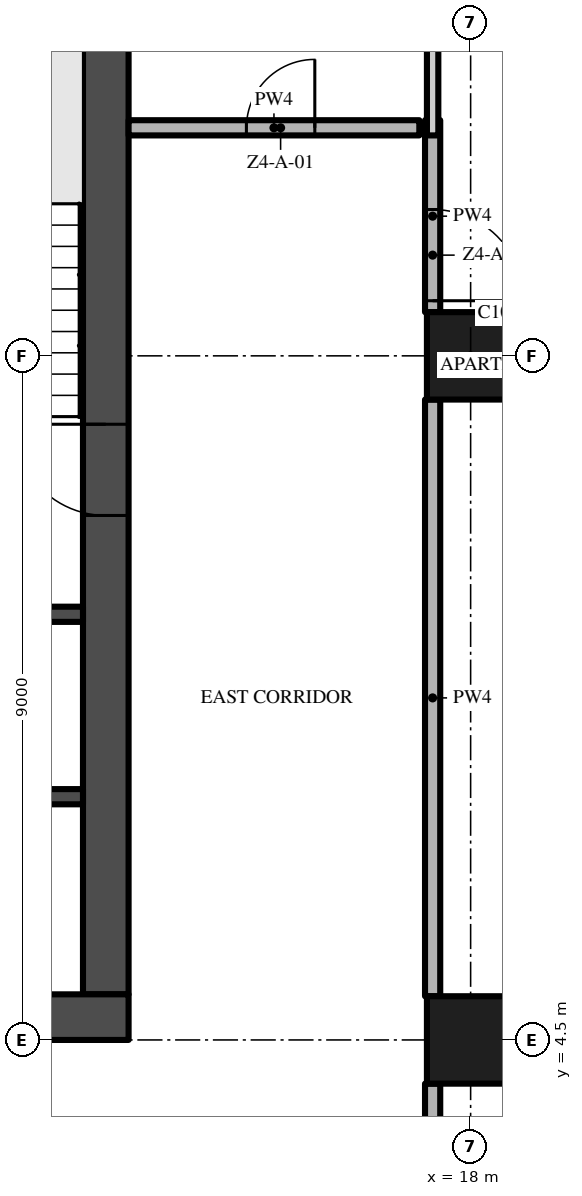
"""IFC4 building model, lengths in metres.
Left out: names, types, materials, properties, quantities, classifications, styles, units other than length and angle.
Written with IfcOpenShell. Run it as: python <this file> out.ifc"""

import sys

from ifc_helpers import new_model, si_unit, direction, frame, frame_2d, origin, origin_2d, place, context, subcontext, project, spatial, rectangle, extrude, element, fill, save


model = new_model("IFC4")
c1 = context("Model", 3, precision=1e-05, world=origin(), true_north=direction((0.0, 1.0)))
c2 = subcontext(c1, "Body", "Model", "MODEL_VIEW")
j1 = project(units=[si_unit("LENGTHUNIT", "METRE"), si_unit("PLANEANGLEUNIT", "RADIAN")], contexts=[c1])
p1 = place(None, origin())
s1 = spatial("IfcSite", under=j1, at=p1, CompositionType="ELEMENT")
p2 = place(p1, origin())
s2 = spatial("IfcBuilding", under=s1, at=p2, CompositionType="ELEMENT")
p3 = place(p2, frame((0.0, 0.0, 192.0)))
s3 = spatial("IfcBuildingStorey", under=s2, at=p3, CompositionType="ELEMENT", Elevation=192.0)
p4 = place(p3, frame((-13.5, 4.8, -0.3), z_axis=(0.0, 0.0, 1.0), x_axis=(1.0, 0.0, 0.0)))
e1 = element("IfcWall", 1, at=p4, inside=s3, PredefinedType="SHEAR", context=c2, shape_type="SweptSolid", body=[
    extrude(rectangle(XDim=27.0, YDim=0.6, at=frame_2d((13.5, 0.0))), origin(), (0.0, 0.0, 1.0), 3.8),
])
p5 = place(p4, frame((12.0, 0.0, 0.3)))
e2 = element("IfcOpeningElement", 2, at=p5, cuts=e1, PredefinedType="OPENING", context=c2, shape_type="SweptSolid", body=[
    extrude(rectangle(XDim=3.0, YDim=2.4, at=frame_2d((1.5, 1.2))), frame((0.0, 0.31, 0.0), z_axis=(0.0, -1.0, 0.0), x_axis=(1.0, 0.0, 0.0)), (0.0, 0.0, 1.0), 0.62),
])
p6 = place(p4, frame((4.9, 0.0, 0.3)))
e3 = element("IfcOpeningElement", 3, at=p6, cuts=e1, PredefinedType="OPENING", context=c2, shape_type="SweptSolid", body=[
    extrude(rectangle(XDim=1.2, YDim=2.2, at=frame_2d((0.6, 1.1))), frame((0.0, 0.31, 0.0), z_axis=(0.0, -1.0, 0.0), x_axis=(1.0, 0.0, 0.0)), (0.0, 0.0, 1.0), 0.62),
])
p7 = place(p4, frame((20.75, 0.0, 0.3)))
e4 = element("IfcOpeningElement", 4, at=p7, cuts=e1, PredefinedType="OPENING", context=c2, shape_type="SweptSolid", body=[
    extrude(rectangle(XDim=1.5, YDim=2.2, at=frame_2d((0.75, 1.1))), frame((0.0, 0.31, 0.0), z_axis=(0.0, -1.0, 0.0), x_axis=(1.0, 0.0, 0.0)), (0.0, 0.0, 1.0), 0.62),
])
p8 = place(p4, frame((17.4, 0.0, 0.3)))
e5 = element("IfcOpeningElement", 5, at=p8, cuts=e1, PredefinedType="OPENING", context=c2, shape_type="SweptSolid", body=[
    extrude(rectangle(XDim=1.2, YDim=2.2, at=frame_2d((0.6, 1.1))), frame((0.0, 0.31, 0.0), z_axis=(0.0, -1.0, 0.0), x_axis=(1.0, 0.0, 0.0)), (0.0, 0.0, 1.0), 0.62),
])
p9 = place(p3, frame((13.2, 5.1, -0.3), z_axis=(0.0, 0.0, 1.0), x_axis=(0.0, 1.0, 0.0)))
e6 = element("IfcWall", 6, at=p9, inside=s3, PredefinedType="SHEAR", context=c2, shape_type="SweptSolid", body=[
    extrude(rectangle(XDim=16.8, YDim=0.6, at=frame_2d((8.4, 0.0))), origin(), (0.0, 0.0, 1.0), 3.8),
])
p10 = place(p9, frame((6.3, 0.0, 0.3)))
e7 = element("IfcOpeningElement", 7, at=p10, cuts=e6, PredefinedType="OPENING", context=c2, shape_type="SweptSolid", body=[
    extrude(rectangle(XDim=1.2, YDim=2.2, at=frame_2d((0.6, 1.1))), frame((0.0, 0.31, 0.0), z_axis=(0.0, -1.0, 0.0), x_axis=(1.0, 0.0, 0.0)), (0.0, 0.0, 1.0), 0.62),
])
for number, where, z_axis, x_axis in (
    (8, (18.0, 13.5, 0.0), (0.0, 0.0, 1.0), (1.0, 0.0, 0.0)),
    (9, (18.0, 4.5, 0.0), (0.0, 0.0, 1.0), (1.0, 0.0, 0.0)),
):
    element("IfcColumn", number, at=place(p3, frame(where, z_axis=z_axis, x_axis=x_axis)), inside=s3, PredefinedType="COLUMN", context=c2, shape_type="SweptSolid", body=[
        extrude(rectangle(XDim=1.15, YDim=1.15, at=origin_2d()), origin(), (0.0, 0.0, 1.0), 3.5),
    ])
for number, where, z_axis, x_axis in (
    (10, (9.65, 7.7, 0.0), (0.0, 0.0, 1.0), (1.0, 0.0, 0.0)),
    (11, (9.65, 10.1, 0.0), (0.0, 0.0, 1.0), (1.0, 0.0, 0.0)),
):
    element("IfcWall", number, at=place(p3, frame(where, z_axis=z_axis, x_axis=x_axis)), inside=s3, PredefinedType="SHEAR", context=c2, shape_type="SweptSolid", body=[
        extrude(rectangle(XDim=3.25, YDim=0.2, at=frame_2d((1.625, 0.0))), origin(), (0.0, 0.0, 1.0), 3.5),
    ])
p11 = place(p3, frame((13.5, 16.5, 0.0), z_axis=(0.0, 0.0, 1.0), x_axis=(1.0, 0.0, 0.0)))
e12 = element("IfcWall", 12, at=p11, inside=s3, PredefinedType="PARTITIONING", context=c2, shape_type="SweptSolid", body=[
    extrude(rectangle(XDim=3.825, YDim=0.2, at=frame_2d((1.913, 0.0))), origin(), (0.0, 0.0, 1.0), 3.5),
])
p12 = place(p11, frame((1.55, 0.0, 0.0)))
e13 = element("IfcOpeningElement", 13, at=p12, cuts=e12, PredefinedType="OPENING", context=c2, shape_type="SweptSolid", body=[
    extrude(rectangle(XDim=0.9, YDim=2.1, at=frame_2d((0.45, 1.05))), frame((0.0, 0.11, 0.0), z_axis=(0.0, -1.0, 0.0), x_axis=(1.0, 0.0, 0.0)), (0.0, 0.0, 1.0), 0.22),
])
p13 = place(p3, frame((17.5, -0.2, 0.0), z_axis=(0.0, 0.0, 1.0), x_axis=(0.0, 1.0, 0.0)))
e14 = element("IfcWall", 14, at=p13, inside=s3, PredefinedType="PARTITIONING", context=c2, shape_type="SweptSolid", body=[
    extrude(rectangle(XDim=4.125, YDim=0.2, at=frame_2d((2.062, 0.0))), origin(), (0.0, 0.0, 1.0), 3.5),
])
p14 = place(p3, frame((17.5, 5.075, 0.0), z_axis=(0.0, 0.0, 1.0), x_axis=(0.0, 1.0, 0.0)))
e15 = element("IfcWall", 15, at=p14, inside=s3, PredefinedType="PARTITIONING", context=c2, shape_type="SweptSolid", body=[
    extrude(rectangle(XDim=7.85, YDim=0.2, at=frame_2d((3.925, 0.0))), origin(), (0.0, 0.0, 1.0), 3.5),
])
p15 = place(p3, frame((17.5, 16.6, 0.0), z_axis=(0.0, 0.0, 1.0), x_axis=(0.0, -1.0, 0.0)))
e16 = element("IfcWall", 16, at=p15, inside=s3, PredefinedType="PARTITIONING", context=c2, shape_type="SweptSolid", body=[
    extrude(rectangle(XDim=2.525, YDim=0.2, at=frame_2d((1.262, 0.0))), origin(), (0.0, 0.0, 1.0), 3.5),
])
p16 = place(p15, frame((1.175, 0.0, 0.0)))
e17 = element("IfcOpeningElement", 17, at=p16, cuts=e16, PredefinedType="OPENING", context=c2, shape_type="SweptSolid", body=[
    extrude(rectangle(XDim=1.2, YDim=2.4, at=frame_2d((0.6, 1.2))), frame((0.0, 0.11, 0.0), z_axis=(0.0, -1.0, 0.0), x_axis=(1.0, 0.0, 0.0)), (0.0, 0.0, 1.0), 0.22),
])
p17 = place(p3, frame((17.5, 16.4, 0.0), z_axis=(0.0, 0.0, 1.0), x_axis=(0.0, 1.0, 0.0)))
e18 = element("IfcWall", 18, at=p17, inside=s3, PredefinedType="PARTITIONING", context=c2, shape_type="SweptSolid", body=[
    extrude(rectangle(XDim=5.05, YDim=0.15, at=frame_2d((2.525, 0.0))), origin(), (0.0, 0.0, 1.0), 3.5),
])
p18 = place(p10, frame((1.2, 0.0, 0.0), z_axis=(0.0, 0.0, 1.0), x_axis=(-1.0, 0.0, 0.0)))
e19 = element("IfcDoor", 19, at=p18, inside=s3, OperationType="SINGLE_SWING_LEFT", PredefinedType="DOOR", context=c2, shape_type="SweptSolid", body=[
    extrude(rectangle(XDim=1.2, YDim=2.2, at=frame_2d((0.6, 1.1))), frame((0.0, 0.025, 0.0), z_axis=(0.0, -1.0, 0.0), x_axis=(1.0, 0.0, 0.0)), (0.0, 0.0, 1.0), 0.05),
])
fill(e7, e19)
p19 = place(p12, origin())
e20 = element("IfcDoor", 20, at=p19, inside=s3, OperationType="SINGLE_SWING_RIGHT", PredefinedType="DOOR", context=c2, shape_type="SweptSolid", body=[
    extrude(rectangle(XDim=0.9, YDim=2.1, at=frame_2d((0.45, 1.05))), frame((0.0, 0.025, 0.0), z_axis=(0.0, -1.0, 0.0), x_axis=(1.0, 0.0, 0.0)), (0.0, 0.0, 1.0), 0.05),
])
fill(e13, e20)
p20 = place(p16, origin())
e21 = element("IfcDoor", 21, at=p20, inside=s3, OperationType="SINGLE_SWING_RIGHT", PredefinedType="DOOR", context=c2, shape_type="SweptSolid", body=[
    extrude(rectangle(XDim=1.2, YDim=2.4, at=frame_2d((0.6, 1.2))), frame((0.0, 0.025, 0.0), z_axis=(0.0, -1.0, 0.0), x_axis=(1.0, 0.0, 0.0)), (0.0, 0.0, 1.0), 0.05),
])
fill(e17, e21)
save(model, sys.argv[1])
